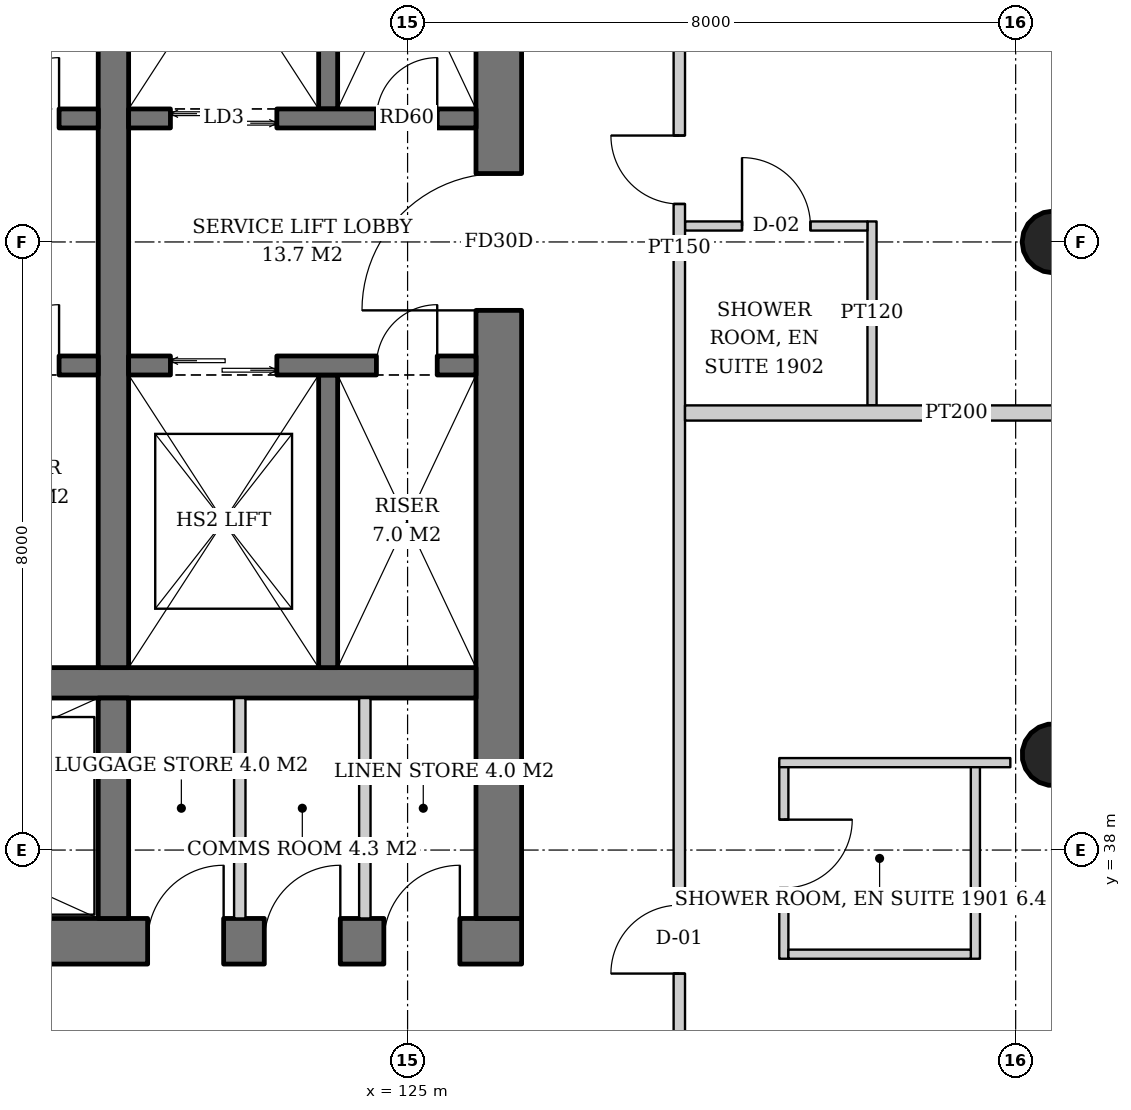
"""IFC4 building model, lengths in metres.
Left out: names, types, materials, properties, quantities, classifications, styles, units other than length and angle.
Written with IfcOpenShell. Run it as: python <this file> out.ifc"""

import sys

from ifc_helpers import new_model, si_unit, direction, frame, frame_2d, origin, origin_2d, place, context, subcontext, project, spatial, rectangle, hollow_circle, extrude, element, fill, save


model = new_model("IFC4")
c1 = context("Model", 3, precision=1e-05, world=origin(), true_north=direction((0.0, 1.0)))
c2 = subcontext(c1, "Body", "Model", "MODEL_VIEW")
j1 = project(units=[si_unit("LENGTHUNIT", "METRE"), si_unit("PLANEANGLEUNIT", "RADIAN")], contexts=[c1])
p1 = place(None, origin())
s1 = spatial("IfcSite", under=j1, at=p1, CompositionType="ELEMENT")
p2 = place(p1, origin())
s2 = spatial("IfcBuilding", under=s1, at=p2, CompositionType="ELEMENT")
p3 = place(p2, frame((0.0, 0.0, 78.0)))
s3 = spatial("IfcBuildingStorey", under=s2, at=p3, CompositionType="ELEMENT", Elevation=78.0)
p4 = place(p3, frame((133.543, 39.229, 0.0), z_axis=(-0.043059584825, 0.021497706284, 0.998841188968), x_axis=(-0.446680166538, -0.894693706707, 0.0)))
e1 = element("IfcColumn", 1, at=p4, inside=s3, PredefinedType="COLUMN", context=c2, shape_type="SweptSolid", body=[
    extrude(hollow_circle(Radius=0.406, WallThickness=0.03, at=origin_2d()), origin(), (0.0, 0.0, 1.0), 3.804),
])
p5 = place(p3, frame((133.543, 46.0, 0.0), z_axis=(-0.043069538298, 0.0, 0.999072076915), x_axis=(0.0, -1.0, 0.0)))
e2 = element("IfcColumn", 2, at=p5, inside=s3, PredefinedType="COLUMN", context=c2, shape_type="SweptSolid", body=[
    extrude(hollow_circle(Radius=0.406, WallThickness=0.03, at=origin_2d()), origin(), (0.0, 0.0, 1.0), 3.803),
])
p6 = place(p3, frame((107.5, 36.8, 0.0), z_axis=(0.0, 0.0, 1.0), x_axis=(1.0, 0.0, 0.0)))
e3 = element("IfcWall", 3, at=p6, inside=s3, PredefinedType="SHEAR", context=c2, shape_type="SweptSolid", body=[
    extrude(rectangle(XDim=19.0, YDim=0.6, at=frame_2d((9.5, 0.0))), origin(), (0.0, 0.0, 1.0), 3.8),
])
p7 = place(p6, frame((3.9, 0.0, 0.0)))
e4 = element("IfcOpeningElement", 4, at=p7, cuts=e3, PredefinedType="OPENING", context=c2, shape_type="SweptSolid", body=[
    extrude(rectangle(XDim=1.0, YDim=2.1, at=frame_2d((0.5, 1.05))), frame((0.0, 0.31, 0.0), z_axis=(0.0, -1.0, 0.0), x_axis=(1.0, 0.0, 0.0)), (0.0, 0.0, 1.0), 0.62),
])
p8 = place(p6, frame((14.08, 0.0, 0.0)))
e5 = element("IfcOpeningElement", 5, at=p8, cuts=e3, PredefinedType="OPENING", context=c2, shape_type="SweptSolid", body=[
    extrude(rectangle(XDim=1.0, YDim=2.1, at=frame_2d((0.5, 1.05))), frame((0.0, 0.31, 0.0), z_axis=(0.0, -1.0, 0.0), x_axis=(1.0, 0.0, 0.0)), (0.0, 0.0, 1.0), 0.62),
])
p9 = place(p6, frame((15.615, 0.0, 0.0)))
e6 = element("IfcOpeningElement", 6, at=p9, cuts=e3, PredefinedType="OPENING", context=c2, shape_type="SweptSolid", body=[
    extrude(rectangle(XDim=1.0, YDim=2.1, at=frame_2d((0.5, 1.05))), frame((0.0, 0.31, 0.0), z_axis=(0.0, -1.0, 0.0), x_axis=(1.0, 0.0, 0.0)), (0.0, 0.0, 1.0), 0.62),
])
p10 = place(p6, frame((17.188, 0.0, 0.0)))
e7 = element("IfcOpeningElement", 7, at=p10, cuts=e3, PredefinedType="OPENING", context=c2, shape_type="SweptSolid", body=[
    extrude(rectangle(XDim=1.0, YDim=2.1, at=frame_2d((0.5, 1.05))), frame((0.0, 0.31, 0.0), z_axis=(0.0, -1.0, 0.0), x_axis=(1.0, 0.0, 0.0)), (0.0, 0.0, 1.0), 0.62),
])
p11 = place(p3, frame((126.2, 37.1, 0.0), z_axis=(0.0, 0.0, 1.0), x_axis=(0.0, 1.0, 0.0)))
e8 = element("IfcWall", 8, at=p11, inside=s3, PredefinedType="SHEAR", context=c2, shape_type="SweptSolid", body=[
    extrude(rectangle(XDim=17.8, YDim=0.6, at=frame_2d((8.9, 0.0))), origin(), (0.0, 0.0, 1.0), 3.8),
])
p12 = place(p11, frame((8.0, 0.0, 0.0)))
e9 = element("IfcOpeningElement", 9, at=p12, cuts=e8, PredefinedType="OPENING", context=c2, shape_type="SweptSolid", body=[
    extrude(rectangle(XDim=1.8, YDim=2.4, at=frame_2d((0.9, 1.2))), frame((0.0, 0.31, 0.0), z_axis=(0.0, -1.0, 0.0), x_axis=(1.0, 0.0, 0.0)), (0.0, 0.0, 1.0), 0.62),
])
p13 = place(p3, frame((108.1, 40.2, 0.0), z_axis=(0.0, 0.0, 1.0), x_axis=(1.0, 0.0, 0.0)))
e10 = element("IfcWall", 10, at=p13, inside=s3, PredefinedType="SHEAR", context=c2, shape_type="SweptSolid", body=[
    extrude(rectangle(XDim=17.8, YDim=0.4, at=frame_2d((8.9, 0.0))), origin(), (0.0, 0.0, 1.0), 3.8),
])
p14 = place(p3, frame((121.13, 37.1, 0.0), z_axis=(0.0, 0.0, 1.0), x_axis=(0.0, 1.0, 0.0)))
e11 = element("IfcWall", 11, at=p14, inside=s3, PredefinedType="SHEAR", context=c2, shape_type="SweptSolid", body=[
    extrude(rectangle(XDim=2.9, YDim=0.4, at=frame_2d((1.45, 0.0))), origin(), (0.0, 0.0, 1.0), 3.8),
])
p15 = place(p3, frame((121.13, 40.4, 0.0), z_axis=(0.0, 0.0, 1.0), x_axis=(0.0, 1.0, 0.0)))
e12 = element("IfcWall", 12, at=p15, inside=s3, PredefinedType="SHEAR", context=c2, shape_type="SweptSolid", body=[
    extrude(rectangle(XDim=11.2, YDim=0.4, at=frame_2d((5.6, 0.0))), origin(), (0.0, 0.0, 1.0), 3.8),
])
p16 = place(p3, frame((108.1, 47.625, 0.0), z_axis=(0.0, 0.0, 1.0), x_axis=(1.0, 0.0, 0.0)))
e13 = element("IfcWall", 13, at=p16, inside=s3, PredefinedType="SHEAR", context=c2, shape_type="SweptSolid", body=[
    extrude(rectangle(XDim=12.83, YDim=0.25, at=frame_2d((6.415, 0.0))), origin(), (0.0, 0.0, 1.0), 3.8),
])
p17 = place(p16, frame((0.7, 0.0, 0.0)))
e14 = element("IfcOpeningElement", 14, at=p17, cuts=e13, PredefinedType="OPENING", context=c2, shape_type="SweptSolid", body=[
    extrude(rectangle(XDim=1.1, YDim=2.2, at=frame_2d((0.55, 1.1))), frame((0.0, 0.135, 0.0), z_axis=(0.0, -1.0, 0.0), x_axis=(1.0, 0.0, 0.0)), (0.0, 0.0, 1.0), 0.27),
])
p18 = place(p16, frame((3.45, 0.0, 0.0)))
e15 = element("IfcOpeningElement", 15, at=p18, cuts=e13, PredefinedType="OPENING", context=c2, shape_type="SweptSolid", body=[
    extrude(rectangle(XDim=1.1, YDim=2.2, at=frame_2d((0.55, 1.1))), frame((0.0, 0.135, 0.0), z_axis=(0.0, -1.0, 0.0), x_axis=(1.0, 0.0, 0.0)), (0.0, 0.0, 1.0), 0.27),
])
p19 = place(p16, frame((6.2, 0.0, 0.0)))
e16 = element("IfcOpeningElement", 16, at=p19, cuts=e13, PredefinedType="OPENING", context=c2, shape_type="SweptSolid", body=[
    extrude(rectangle(XDim=1.1, YDim=2.2, at=frame_2d((0.55, 1.1))), frame((0.0, 0.135, 0.0), z_axis=(0.0, -1.0, 0.0), x_axis=(1.0, 0.0, 0.0)), (0.0, 0.0, 1.0), 0.27),
])
p20 = place(p16, frame((8.95, 0.0, 0.0)))
e17 = element("IfcOpeningElement", 17, at=p20, cuts=e13, PredefinedType="OPENING", context=c2, shape_type="SweptSolid", body=[
    extrude(rectangle(XDim=1.1, YDim=2.2, at=frame_2d((0.55, 1.1))), frame((0.0, 0.135, 0.0), z_axis=(0.0, -1.0, 0.0), x_axis=(1.0, 0.0, 0.0)), (0.0, 0.0, 1.0), 0.27),
])
p21 = place(p16, frame((11.515, 0.0, 0.0)))
e18 = element("IfcOpeningElement", 18, at=p21, cuts=e13, PredefinedType="OPENING", context=c2, shape_type="SweptSolid", body=[
    extrude(rectangle(XDim=0.8, YDim=2.0, at=frame_2d((0.4, 1.0))), frame((0.0, 0.135, 0.0), z_axis=(0.0, -1.0, 0.0), x_axis=(1.0, 0.0, 0.0)), (0.0, 0.0, 1.0), 0.27),
])
p22 = place(p3, frame((108.1, 44.375, 0.0), z_axis=(0.0, 0.0, 1.0), x_axis=(1.0, 0.0, 0.0)))
e19 = element("IfcWall", 19, at=p22, inside=s3, PredefinedType="SHEAR", context=c2, shape_type="SweptSolid", body=[
    extrude(rectangle(XDim=12.83, YDim=0.25, at=frame_2d((6.415, 0.0))), origin(), (0.0, 0.0, 1.0), 3.8),
])
p23 = place(p22, frame((0.7, 0.0, 0.0)))
e20 = element("IfcOpeningElement", 20, at=p23, cuts=e19, PredefinedType="OPENING", context=c2, shape_type="SweptSolid", body=[
    extrude(rectangle(XDim=1.1, YDim=2.2, at=frame_2d((0.55, 1.1))), frame((0.0, 0.135, 0.0), z_axis=(0.0, -1.0, 0.0), x_axis=(1.0, 0.0, 0.0)), (0.0, 0.0, 1.0), 0.27),
])
p24 = place(p22, frame((3.45, 0.0, 0.0)))
e21 = element("IfcOpeningElement", 21, at=p24, cuts=e19, PredefinedType="OPENING", context=c2, shape_type="SweptSolid", body=[
    extrude(rectangle(XDim=1.1, YDim=2.2, at=frame_2d((0.55, 1.1))), frame((0.0, 0.135, 0.0), z_axis=(0.0, -1.0, 0.0), x_axis=(1.0, 0.0, 0.0)), (0.0, 0.0, 1.0), 0.27),
])
p25 = place(p22, frame((6.2, 0.0, 0.0)))
e22 = element("IfcOpeningElement", 22, at=p25, cuts=e19, PredefinedType="OPENING", context=c2, shape_type="SweptSolid", body=[
    extrude(rectangle(XDim=1.1, YDim=2.2, at=frame_2d((0.55, 1.1))), frame((0.0, 0.135, 0.0), z_axis=(0.0, -1.0, 0.0), x_axis=(1.0, 0.0, 0.0)), (0.0, 0.0, 1.0), 0.27),
])
p26 = place(p22, frame((9.0, 0.0, 0.0)))
e23 = element("IfcOpeningElement", 23, at=p26, cuts=e19, PredefinedType="OPENING", context=c2, shape_type="SweptSolid", body=[
    extrude(rectangle(XDim=1.0, YDim=2.1, at=frame_2d((0.5, 1.05))), frame((0.0, 0.135, 0.0), z_axis=(0.0, -1.0, 0.0), x_axis=(1.0, 0.0, 0.0)), (0.0, 0.0, 1.0), 0.27),
])
p27 = place(p22, frame((11.515, 0.0, 0.0)))
e24 = element("IfcOpeningElement", 24, at=p27, cuts=e19, PredefinedType="OPENING", context=c2, shape_type="SweptSolid", body=[
    extrude(rectangle(XDim=0.8, YDim=2.0, at=frame_2d((0.4, 1.0))), frame((0.0, 0.135, 0.0), z_axis=(0.0, -1.0, 0.0), x_axis=(1.0, 0.0, 0.0)), (0.0, 0.0, 1.0), 0.27),
])
p28 = place(p3, frame((123.955, 47.75, 0.0), z_axis=(0.0, 0.0, 1.0), x_axis=(0.0, 1.0, 0.0)))
e25 = element("IfcWall", 25, at=p28, inside=s3, PredefinedType="SHEAR", context=c2, shape_type="SweptSolid", body=[
    extrude(rectangle(XDim=3.85, YDim=0.25, at=frame_2d((1.925, 0.0))), origin(), (0.0, 0.0, 1.0), 3.8),
])
p29 = place(p3, frame((121.33, 47.625, 0.0), z_axis=(0.0, 0.0, 1.0), x_axis=(1.0, 0.0, 0.0)))
e26 = element("IfcWall", 26, at=p29, inside=s3, PredefinedType="SHEAR", context=c2, shape_type="SweptSolid", body=[
    extrude(rectangle(XDim=4.57, YDim=0.25, at=frame_2d((2.285, 0.0))), origin(), (0.0, 0.0, 1.0), 3.8),
])
p30 = place(p29, frame((0.55, 0.0, 0.0)))
e27 = element("IfcOpeningElement", 27, at=p30, cuts=e26, PredefinedType="OPENING", context=c2, shape_type="SweptSolid", body=[
    extrude(rectangle(XDim=1.4, YDim=2.4, at=frame_2d((0.7, 1.2))), frame((0.0, 0.135, 0.0), z_axis=(0.0, -1.0, 0.0), x_axis=(1.0, 0.0, 0.0)), (0.0, 0.0, 1.0), 0.27),
])
p31 = place(p29, frame((3.26, 0.0, 0.0)))
e28 = element("IfcOpeningElement", 28, at=p31, cuts=e26, PredefinedType="OPENING", context=c2, shape_type="SweptSolid", body=[
    extrude(rectangle(XDim=0.8, YDim=2.0, at=frame_2d((0.4, 1.0))), frame((0.0, 0.135, 0.0), z_axis=(0.0, -1.0, 0.0), x_axis=(1.0, 0.0, 0.0)), (0.0, 0.0, 1.0), 0.27),
])
p32 = place(p3, frame((123.955, 44.25, 0.0), z_axis=(0.0, 0.0, 1.0), x_axis=(0.0, -1.0, 0.0)))
e29 = element("IfcWall", 29, at=p32, inside=s3, PredefinedType="SHEAR", context=c2, shape_type="SweptSolid", body=[
    extrude(rectangle(XDim=3.85, YDim=0.25, at=frame_2d((1.925, 0.0))), origin(), (0.0, 0.0, 1.0), 3.8),
])
p33 = place(p3, frame((121.33, 44.375, 0.0), z_axis=(0.0, 0.0, 1.0), x_axis=(1.0, 0.0, 0.0)))
e30 = element("IfcWall", 30, at=p33, inside=s3, PredefinedType="SHEAR", context=c2, shape_type="SweptSolid", body=[
    extrude(rectangle(XDim=4.57, YDim=0.25, at=frame_2d((2.285, 0.0))), origin(), (0.0, 0.0, 1.0), 3.8),
])
p34 = place(p33, frame((0.55, 0.0, 0.0)))
e31 = element("IfcOpeningElement", 31, at=p34, cuts=e30, PredefinedType="OPENING", context=c2, shape_type="SweptSolid", body=[
    extrude(rectangle(XDim=1.4, YDim=2.4, at=frame_2d((0.7, 1.2))), frame((0.0, 0.135, 0.0), z_axis=(0.0, -1.0, 0.0), x_axis=(1.0, 0.0, 0.0)), (0.0, 0.0, 1.0), 0.27),
])
p35 = place(p33, frame((3.26, 0.0, 0.0)))
e32 = element("IfcOpeningElement", 32, at=p35, cuts=e30, PredefinedType="OPENING", context=c2, shape_type="SweptSolid", body=[
    extrude(rectangle(XDim=0.8, YDim=2.0, at=frame_2d((0.4, 1.0))), frame((0.0, 0.135, 0.0), z_axis=(0.0, -1.0, 0.0), x_axis=(1.0, 0.0, 0.0)), (0.0, 0.0, 1.0), 0.27),
])
for number, where, z_axis, x_axis in (
    (33, (122.792, 37.1, 0.0), (0.0, 0.0, 1.0), (0.0, 1.0, 0.0)),
    (34, (124.438, 37.1, 0.0), (0.0, 0.0, 1.0), (0.0, 1.0, 0.0)),
):
    element("IfcWall", number, at=place(p3, frame(where, z_axis=z_axis, x_axis=x_axis)), inside=s3, PredefinedType="SOLIDWALL", context=c2, shape_type="SweptSolid", body=[
        extrude(rectangle(XDim=2.9, YDim=0.15, at=frame_2d((1.45, 0.0))), origin(), (0.0, 0.0, 1.0), 3.52),
    ])
p36 = place(p3, frame((129.95, 39.15, 0.0), z_axis=(0.0, 0.0, 1.0), x_axis=(0.0, -1.0, 0.0)))
e35 = element("IfcWall", 35, at=p36, inside=s3, PredefinedType="PARTITIONING", context=c2, shape_type="SweptSolid", body=[
    extrude(rectangle(XDim=2.58, YDim=0.12, at=frame_2d((1.29, 0.0))), origin(), (0.0, 0.0, 1.0), 2.82),
])
p37 = place(p36, frame((0.75, 0.0, 0.0)))
e36 = element("IfcOpeningElement", 36, at=p37, cuts=e35, PredefinedType="OPENING", context=c2, shape_type="SweptSolid", body=[
    extrude(rectangle(XDim=0.9, YDim=2.1, at=frame_2d((0.45, 1.05))), frame((0.0, 0.07, 0.0), z_axis=(0.0, -1.0, 0.0), x_axis=(1.0, 0.0, 0.0)), (0.0, 0.0, 1.0), 0.14),
])
p38 = place(p3, frame((132.47, 39.15, 0.0), z_axis=(0.0, 0.0, 1.0), x_axis=(0.0, -1.0, 0.0)))
e37 = element("IfcWall", 37, at=p38, inside=s3, PredefinedType="PARTITIONING", context=c2, shape_type="SweptSolid", body=[
    extrude(rectangle(XDim=2.58, YDim=0.12, at=frame_2d((1.29, 0.0))), origin(), (0.0, 0.0, 1.0), 2.82),
])
p39 = place(p3, frame((130.01, 36.63, 0.0), z_axis=(0.0, 0.0, 1.0), x_axis=(1.0, 0.0, 0.0)))
e38 = element("IfcWall", 38, at=p39, inside=s3, PredefinedType="PARTITIONING", context=c2, shape_type="SweptSolid", body=[
    extrude(rectangle(XDim=2.4, YDim=0.12, at=frame_2d((1.2, 0.0))), origin(), (0.0, 0.0, 1.0), 2.82),
])
p40 = place(p3, frame((129.89, 39.15, 0.0), z_axis=(0.0, 0.0, 1.0), x_axis=(1.0, 0.0, 0.0)))
e39 = element("IfcWall", 39, at=p40, inside=s3, PredefinedType="PARTITIONING", context=c2, shape_type="SweptSolid", body=[
    extrude(rectangle(XDim=3.04, YDim=0.12, at=frame_2d((1.52, 0.0))), origin(), (0.0, 0.0, 1.0), 3.52),
])
p41 = place(p3, frame((131.11, 43.85, 0.0), z_axis=(0.0, 0.0, 1.0), x_axis=(0.0, 1.0, 0.0)))
e40 = element("IfcWall", 40, at=p41, inside=s3, PredefinedType="PARTITIONING", context=c2, shape_type="SweptSolid", body=[
    extrude(rectangle(XDim=2.42, YDim=0.12, at=frame_2d((1.21, 0.0))), origin(), (0.0, 0.0, 1.0), 2.72),
])
p42 = place(p3, frame((128.65, 46.21, 0.0), z_axis=(0.0, 0.0, 1.0), x_axis=(1.0, 0.0, 0.0)))
e41 = element("IfcWall", 41, at=p42, inside=s3, PredefinedType="PARTITIONING", context=c2, shape_type="SweptSolid", body=[
    extrude(rectangle(XDim=2.4, YDim=0.12, at=frame_2d((1.2, 0.0))), origin(), (0.0, 0.0, 1.0), 3.52),
])
p43 = place(p42, frame((0.75, 0.0, 0.0)))
e42 = element("IfcOpeningElement", 42, at=p43, cuts=e41, PredefinedType="OPENING", context=c2, shape_type="SweptSolid", body=[
    extrude(rectangle(XDim=0.9, YDim=2.1, at=frame_2d((0.45, 1.05))), frame((0.0, 0.07, 0.0), z_axis=(0.0, -1.0, 0.0), x_axis=(1.0, 0.0, 0.0)), (0.0, 0.0, 1.0), 0.14),
])
p44 = place(p3, frame((128.575, 34.35, 0.0), z_axis=(0.0, 0.0, 1.0), x_axis=(0.0, 1.0, 0.0)))
e43 = element("IfcWall", 43, at=p44, inside=s3, PredefinedType="PARTITIONING", context=c2, shape_type="SweptSolid", body=[
    extrude(rectangle(XDim=23.15, YDim=0.15, at=frame_2d((11.575, 0.0))), origin(), (0.0, 0.0, 1.0), 2.72),
])
p45 = place(p44, frame((2.025, 0.0, 0.0)))
e44 = element("IfcOpeningElement", 44, at=p45, cuts=e43, PredefinedType="OPENING", context=c2, shape_type="SweptSolid", body=[
    extrude(rectangle(XDim=0.9, YDim=2.1, at=frame_2d((0.45, 1.05))), frame((0.0, 0.085, 0.0), z_axis=(0.0, -1.0, 0.0), x_axis=(1.0, 0.0, 0.0)), (0.0, 0.0, 1.0), 0.17),
])
p46 = place(p44, frame((12.15, 0.0, 0.0)))
e45 = element("IfcOpeningElement", 45, at=p46, cuts=e43, PredefinedType="OPENING", context=c2, shape_type="SweptSolid", body=[
    extrude(rectangle(XDim=0.9, YDim=2.1, at=frame_2d((0.45, 1.05))), frame((0.0, 0.085, 0.0), z_axis=(0.0, -1.0, 0.0), x_axis=(1.0, 0.0, 0.0)), (0.0, 0.0, 1.0), 0.17),
])
p47 = place(p3, frame((128.65, 43.75, 0.0), z_axis=(0.0, 0.0, 1.0), x_axis=(1.0, 0.0, 0.0)))
e46 = element("IfcWall", 46, at=p47, inside=s3, PredefinedType="PARTITIONING", context=c2, shape_type="SweptSolid", body=[
    extrude(rectangle(XDim=7.14, YDim=0.2, at=frame_2d((3.57, 0.0))), origin(), (0.0, 0.0, 1.0), 3.12),
])
p48 = place(p21, origin())
e47 = element("IfcDoor", 47, at=p48, inside=s3, OperationType="SINGLE_SWING_RIGHT", PredefinedType="DOOR", context=c2, shape_type="SweptSolid", body=[
    extrude(rectangle(XDim=0.8, YDim=2.0, at=frame_2d((0.4, 1.0))), frame((0.0, 0.025, 0.0), z_axis=(0.0, -1.0, 0.0), x_axis=(1.0, 0.0, 0.0)), (0.0, 0.0, 1.0), 0.05),
])
fill(e18, e47)
p49 = place(p27, origin())
e48 = element("IfcDoor", 48, at=p49, inside=s3, OperationType="SINGLE_SWING_RIGHT", PredefinedType="DOOR", context=c2, shape_type="SweptSolid", body=[
    extrude(rectangle(XDim=0.8, YDim=2.0, at=frame_2d((0.4, 1.0))), frame((0.0, 0.025, 0.0), z_axis=(0.0, -1.0, 0.0), x_axis=(1.0, 0.0, 0.0)), (0.0, 0.0, 1.0), 0.05),
])
fill(e24, e48)
p50 = place(p30, origin())
e49 = element("IfcDoor", 49, at=p50, inside=s3, OperationType="DOUBLE_DOOR_SLIDING", PredefinedType="DOOR", context=c2, shape_type="SweptSolid", body=[
    extrude(rectangle(XDim=1.4, YDim=2.4, at=frame_2d((0.7, 1.2))), frame((0.0, 0.025, 0.0), z_axis=(0.0, -1.0, 0.0), x_axis=(1.0, 0.0, 0.0)), (0.0, 0.0, 1.0), 0.05),
])
fill(e27, e49)
p51 = place(p31, origin())
e50 = element("IfcDoor", 50, at=p51, inside=s3, OperationType="SINGLE_SWING_RIGHT", PredefinedType="DOOR", context=c2, shape_type="SweptSolid", body=[
    extrude(rectangle(XDim=0.8, YDim=2.0, at=frame_2d((0.4, 1.0))), frame((0.0, 0.025, 0.0), z_axis=(0.0, -1.0, 0.0), x_axis=(1.0, 0.0, 0.0)), (0.0, 0.0, 1.0), 0.05),
])
fill(e28, e50)
p52 = place(p34, origin())
e51 = element("IfcDoor", 51, at=p52, inside=s3, OperationType="DOUBLE_DOOR_SLIDING", PredefinedType="DOOR", context=c2, shape_type="SweptSolid", body=[
    extrude(rectangle(XDim=1.4, YDim=2.4, at=frame_2d((0.7, 1.2))), frame((0.0, 0.025, 0.0), z_axis=(0.0, -1.0, 0.0), x_axis=(1.0, 0.0, 0.0)), (0.0, 0.0, 1.0), 0.05),
])
fill(e31, e51)
p53 = place(p35, origin())
e52 = element("IfcDoor", 52, at=p53, inside=s3, OperationType="SINGLE_SWING_RIGHT", PredefinedType="DOOR", context=c2, shape_type="SweptSolid", body=[
    extrude(rectangle(XDim=0.8, YDim=2.0, at=frame_2d((0.4, 1.0))), frame((0.0, 0.025, 0.0), z_axis=(0.0, -1.0, 0.0), x_axis=(1.0, 0.0, 0.0)), (0.0, 0.0, 1.0), 0.05),
])
fill(e32, e52)
p54 = place(p12, origin())
e53 = element("IfcDoor", 53, at=p54, inside=s3, OperationType="DOUBLE_DOOR_SINGLE_SWING", PredefinedType="DOOR", context=c2, shape_type="SweptSolid", body=[
    extrude(rectangle(XDim=1.8, YDim=2.4, at=frame_2d((0.9, 1.2))), frame((0.0, 0.025, 0.0), z_axis=(0.0, -1.0, 0.0), x_axis=(1.0, 0.0, 0.0)), (0.0, 0.0, 1.0), 0.05),
])
fill(e9, e53)
p55 = place(p8, origin())
e54 = element("IfcDoor", 54, at=p55, inside=s3, OperationType="SINGLE_SWING_RIGHT", PredefinedType="DOOR", context=c2, shape_type="SweptSolid", body=[
    extrude(rectangle(XDim=1.0, YDim=2.1, at=frame_2d((0.5, 1.05))), frame((0.0, 0.29, 0.0), z_axis=(0.0, -1.0, 0.0), x_axis=(1.0, 0.0, 0.0)), (0.0, 0.0, 1.0), 0.05),
])
fill(e5, e54)
p56 = place(p9, origin())
e55 = element("IfcDoor", 55, at=p56, inside=s3, OperationType="SINGLE_SWING_RIGHT", PredefinedType="DOOR", context=c2, shape_type="SweptSolid", body=[
    extrude(rectangle(XDim=1.0, YDim=2.1, at=frame_2d((0.5, 1.05))), frame((0.0, 0.29, 0.0), z_axis=(0.0, -1.0, 0.0), x_axis=(1.0, 0.0, 0.0)), (0.0, 0.0, 1.0), 0.05),
])
fill(e6, e55)
p57 = place(p10, origin())
e56 = element("IfcDoor", 56, at=p57, inside=s3, OperationType="SINGLE_SWING_RIGHT", PredefinedType="DOOR", context=c2, shape_type="SweptSolid", body=[
    extrude(rectangle(XDim=1.0, YDim=2.1, at=frame_2d((0.5, 1.05))), frame((0.0, 0.29, 0.0), z_axis=(0.0, -1.0, 0.0), x_axis=(1.0, 0.0, 0.0)), (0.0, 0.0, 1.0), 0.05),
])
fill(e7, e56)
p58 = place(p37, origin())
e57 = element("IfcDoor", 57, at=p58, inside=s3, OperationType="SINGLE_SWING_LEFT", PredefinedType="DOOR", context=c2, shape_type="SweptSolid", body=[
    extrude(rectangle(XDim=0.9, YDim=2.1, at=frame_2d((0.45, 1.05))), frame((0.0, 0.025, 0.0), z_axis=(0.0, -1.0, 0.0), x_axis=(1.0, 0.0, 0.0)), (0.0, 0.0, 1.0), 0.05),
])
fill(e36, e57)
p59 = place(p43, origin())
e58 = element("IfcDoor", 58, at=p59, inside=s3, OperationType="SINGLE_SWING_LEFT", PredefinedType="DOOR", context=c2, shape_type="SweptSolid", body=[
    extrude(rectangle(XDim=0.9, YDim=2.1, at=frame_2d((0.45, 1.05))), frame((0.0, 0.025, 0.0), z_axis=(0.0, -1.0, 0.0), x_axis=(1.0, 0.0, 0.0)), (0.0, 0.0, 1.0), 0.05),
])
fill(e42, e58)
p60 = place(p45, origin())
e59 = element("IfcDoor", 59, at=p60, inside=s3, OperationType="SINGLE_SWING_LEFT", PredefinedType="DOOR", context=c2, shape_type="SweptSolid", body=[
    extrude(rectangle(XDim=0.9, YDim=2.1, at=frame_2d((0.45, 1.05))), frame((0.0, 0.025, 0.0), z_axis=(0.0, -1.0, 0.0), x_axis=(1.0, 0.0, 0.0)), (0.0, 0.0, 1.0), 0.05),
])
fill(e44, e59)
p61 = place(p46, origin())
e60 = element("IfcDoor", 60, at=p61, inside=s3, OperationType="SINGLE_SWING_RIGHT", PredefinedType="DOOR", context=c2, shape_type="SweptSolid", body=[
    extrude(rectangle(XDim=0.9, YDim=2.1, at=frame_2d((0.45, 1.05))), frame((0.0, 0.025, 0.0), z_axis=(0.0, -1.0, 0.0), x_axis=(1.0, 0.0, 0.0)), (0.0, 0.0, 1.0), 0.05),
])
fill(e45, e60)
save(model, sys.argv[1])
